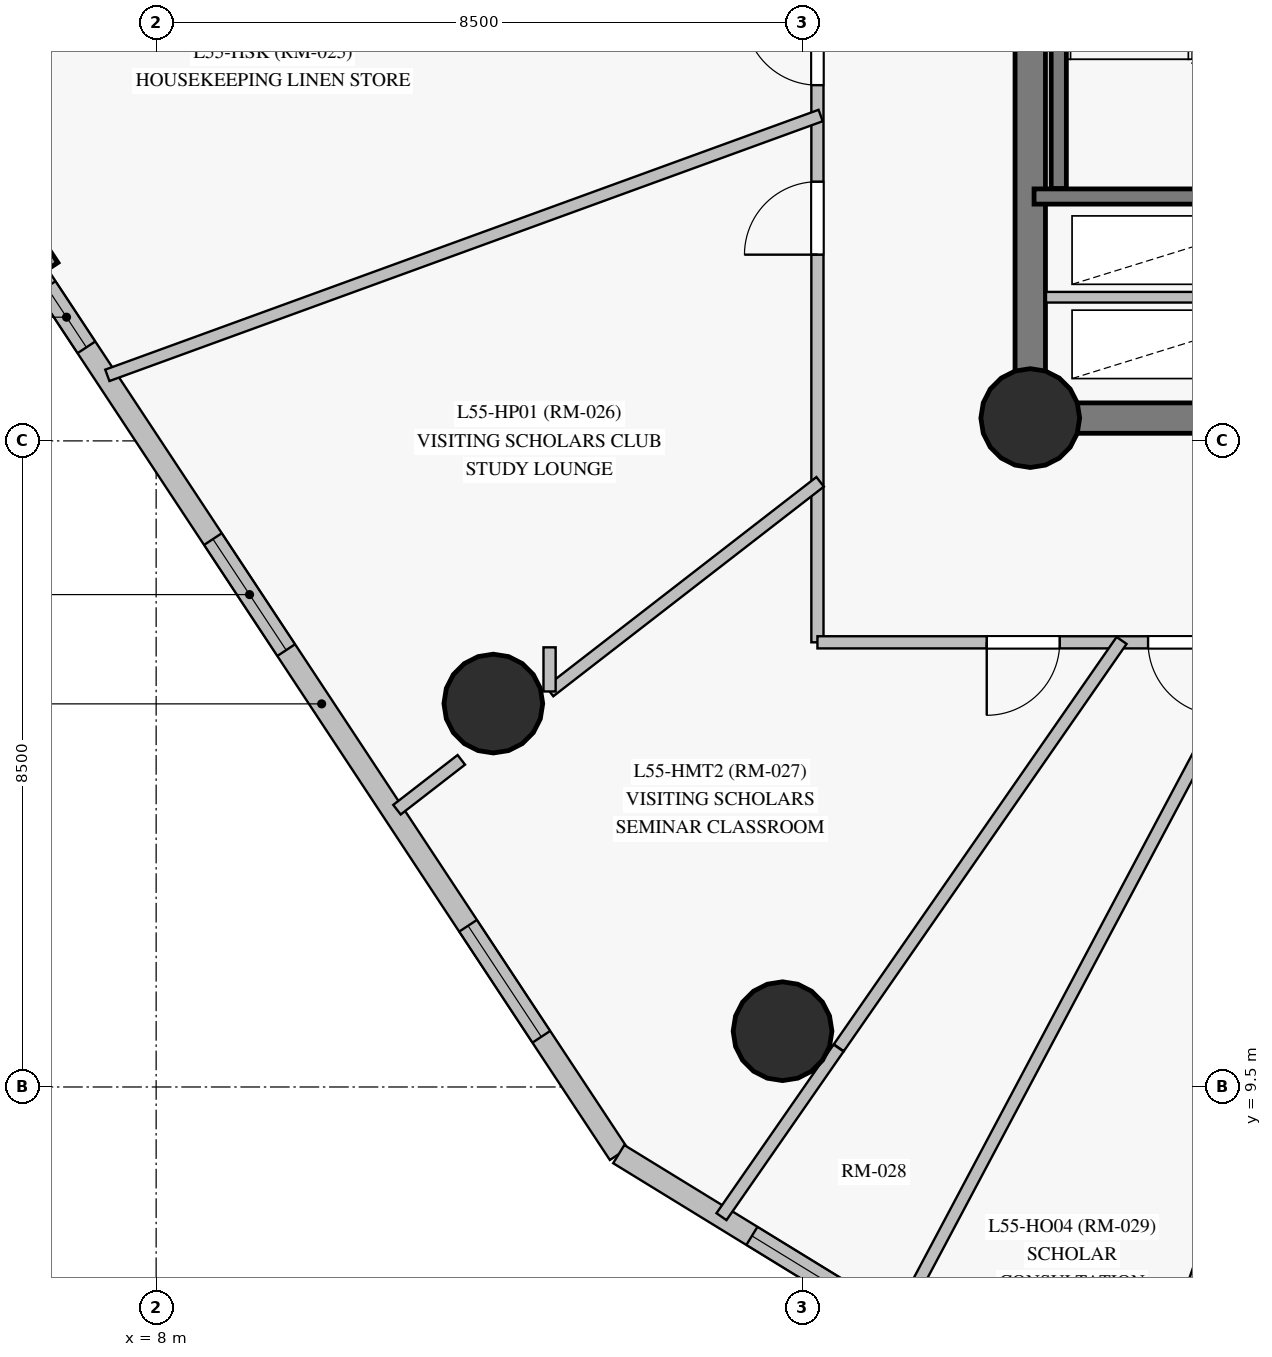
"""IFC4 building model, lengths in metres.
Left out: names, types, materials, properties, quantities, classifications, styles, units other than length and angle.
Written with IfcOpenShell. Run it as: python <this file> out.ifc"""

import sys

from ifc_helpers import new_model, si_unit, direction, frame, frame_2d, origin, origin_with_axes, origin_2d, place, context, subcontext, project, spatial, rectangle, circle, extrude, source, transform, mapped, element, fill, save


model = new_model("IFC4")
c1 = context("Model", 3, precision=1e-05, world=origin(), true_north=direction((0.0, 1.0)))
c2 = subcontext(c1, "Body", "Model", "MODEL_VIEW")
j1 = project(units=[si_unit("LENGTHUNIT", "METRE"), si_unit("PLANEANGLEUNIT", "RADIAN")], contexts=[c1])
p1 = place(None, origin())
s1 = spatial("IfcSite", under=j1, at=p1, CompositionType="ELEMENT")
p2 = place(p1, origin())
s2 = spatial("IfcBuilding", under=s1, at=p2, CompositionType="ELEMENT")
p3 = place(p2, frame((0.0, 0.0, 190.1)))
s3 = spatial("IfcBuildingStorey", under=s2, at=p3, CompositionType="ELEMENT", Elevation=190.1)
p4 = place(p3, frame((19.5, 18.3, 0.0), z_axis=(0.0, 0.0, 1.0), x_axis=(1.0, 0.0, 0.0)))
e1 = element("IfcWall", 1, at=p4, inside=s3, PredefinedType="SHEAR", context=c2, shape_type="SweptSolid", body=[
    extrude(rectangle(XDim=7.05, YDim=0.4, at=frame_2d((3.525, 0.0))), origin(), (0.0, 0.0, 1.0), 2.825),
])
p5 = place(p4, frame((4.2, 0.0, 0.0)))
e2 = element("IfcOpeningElement", 2, at=p5, cuts=e1, PredefinedType="OPENING", context=c2, shape_type="SweptSolid", body=[
    extrude(rectangle(XDim=1.4, YDim=2.2, at=frame_2d((0.7, 1.1))), frame((0.0, 0.21, 0.0), z_axis=(0.0, -1.0, 0.0), x_axis=(1.0, 0.0, 0.0)), (0.0, 0.0, 1.0), 0.42),
])
p6 = place(p3, frame((19.5, 34.7, 0.0), z_axis=(0.0, 0.0, 1.0), x_axis=(0.0, -1.0, 0.0)))
e3 = element("IfcWall", 3, at=p6, inside=s3, PredefinedType="SHEAR", context=c2, shape_type="SweptSolid", body=[
    extrude(rectangle(XDim=16.4, YDim=0.4, at=frame_2d((8.2, 0.0))), origin(), (0.0, 0.0, 1.0), 2.825),
])
p7 = place(p6, frame((3.1, 0.0, 0.0)))
e4 = element("IfcOpeningElement", 4, at=p7, cuts=e3, PredefinedType="OPENING", context=c2, shape_type="SweptSolid", body=[
    extrude(rectangle(XDim=1.1, YDim=2.15, at=frame_2d((0.55, 1.075))), frame((0.0, 0.21, 0.0), z_axis=(0.0, -1.0, 0.0), x_axis=(1.0, 0.0, 0.0)), (0.0, 0.0, 1.0), 0.42),
])
m1 = source(origin_with_axes(), c2, "Body", "SweptSolid", [
    extrude(circle(Radius=0.65, at=origin_2d()), origin(), (0.0, 0.0, 1.0), 3.05),
])
for number, where, z_axis, x_axis in (
    (5, (19.5, 18.3, 0.0), (0.0, 0.0, 1.0), (1.0, 0.0, 0.0)),
    (6, (12.436, 14.544, 0.0), (0.0, 0.0, 1.0), (1.0, 0.0, 0.0)),
    (7, (16.241, 10.234, 0.0), (0.0, 0.0, 1.0), (1.0, 0.0, 0.0)),
):
    element("IfcColumn", number, at=place(p3, frame(where, z_axis=z_axis, x_axis=x_axis)), inside=s3, PredefinedType="COLUMN", context=c2, shape_type="MappedRepresentation", body=[
        mapped(m1, transform((0.0, 0.0, 0.0), scale=1.0)),
    ])
p8 = place(p3, frame((6.269, 20.464, 0.0), z_axis=(0.0, 0.0, 1.0), x_axis=(0.550716639054, -0.834692268725, 0.0)))
e8 = element("IfcWall", 8, at=p8, inside=s3, PredefinedType="SOLIDWALL", context=c2, shape_type="SweptSolid", body=[
    extrude(rectangle(XDim=14.194, YDim=0.28, at=frame_2d((7.097, 0.0))), origin(), (0.0, 0.0, 1.0), 2.825),
])
p9 = place(p8, frame((0.527, 0.0, 0.85)))
e9 = element("IfcOpeningElement", 9, at=p9, cuts=e8, PredefinedType="OPENING", context=c2, shape_type="SweptSolid", body=[
    extrude(rectangle(XDim=0.95, YDim=1.5, at=frame_2d((0.475, 0.75))), frame((0.0, 0.15, 0.0), z_axis=(0.0, -1.0, 0.0), x_axis=(1.0, 0.0, 0.0)), (0.0, 0.0, 1.0), 0.3),
])
p10 = place(p8, frame((4.5, 0.0, 0.85)))
e10 = element("IfcOpeningElement", 10, at=p10, cuts=e8, PredefinedType="OPENING", context=c2, shape_type="SweptSolid", body=[
    extrude(rectangle(XDim=1.75, YDim=1.65, at=frame_2d((0.875, 0.825))), frame((0.0, 0.15, 0.0), z_axis=(0.0, -1.0, 0.0), x_axis=(1.0, 0.0, 0.0)), (0.0, 0.0, 1.0), 0.3),
])
p11 = place(p8, frame((10.594, 0.0, 0.85)))
e11 = element("IfcOpeningElement", 11, at=p11, cuts=e8, PredefinedType="OPENING", context=c2, shape_type="SweptSolid", body=[
    extrude(rectangle(XDim=1.75, YDim=1.65, at=frame_2d((0.875, 0.825))), frame((0.0, 0.15, 0.0), z_axis=(0.0, -1.0, 0.0), x_axis=(1.0, 0.0, 0.0)), (0.0, 0.0, 1.0), 0.3),
])
p12 = place(p3, frame((14.086, 8.616, 0.0), z_axis=(0.0, 0.0, 1.0), x_axis=(0.852261121645, -0.523116603189, 0.0)))
e12 = element("IfcWall", 12, at=p12, inside=s3, PredefinedType="SOLIDWALL", context=c2, shape_type="SweptSolid", body=[
    extrude(rectangle(XDim=10.239, YDim=0.28, at=frame_2d((5.12, 0.0))), origin(), (0.0, 0.0, 1.0), 2.825),
])
p13 = place(p12, frame((2.056, 0.0, 0.85)))
e13 = element("IfcOpeningElement", 13, at=p13, cuts=e12, PredefinedType="OPENING", context=c2, shape_type="SweptSolid", body=[
    extrude(rectangle(XDim=1.75, YDim=1.65, at=frame_2d((0.875, 0.825))), frame((0.0, 0.15, 0.0), z_axis=(0.0, -1.0, 0.0), x_axis=(1.0, 0.0, 0.0)), (0.0, 0.0, 1.0), 0.3),
])
p14 = place(p12, frame((5.203, 0.0, 0.85)))
e14 = element("IfcOpeningElement", 14, at=p14, cuts=e12, PredefinedType="OPENING", context=c2, shape_type="SweptSolid", body=[
    extrude(rectangle(XDim=1.75, YDim=1.65, at=frame_2d((0.875, 0.825))), frame((0.0, 0.15, 0.0), z_axis=(0.0, -1.0, 0.0), x_axis=(1.0, 0.0, 0.0)), (0.0, 0.0, 1.0), 0.3),
])
p15 = place(p12, frame((8.554, 0.0, 0.85)))
e15 = element("IfcOpeningElement", 15, at=p15, cuts=e12, PredefinedType="OPENING", context=c2, shape_type="SweptSolid", body=[
    extrude(rectangle(XDim=0.95, YDim=1.5, at=frame_2d((0.475, 0.75))), frame((0.0, 0.15, 0.0), z_axis=(0.0, -1.0, 0.0), x_axis=(1.0, 0.0, 0.0)), (0.0, 0.0, 1.0), 0.3),
])
p16 = place(p3, frame((19.875, 21.32, 0.0), z_axis=(0.0, 0.0, 1.0), x_axis=(0.0, 1.0, 0.0)))
e16 = element("IfcWall", 16, at=p16, inside=s3, PredefinedType="SHEAR", context=c2, shape_type="SweptSolid", body=[
    extrude(rectangle(XDim=7.5, YDim=0.2, at=frame_2d((3.75, 0.0))), origin(), (0.0, 0.0, 1.0), 2.825),
])
p17 = place(p3, frame((19.55, 21.215, 0.0), z_axis=(0.0, 0.0, 1.0), x_axis=(1.0, 0.0, 0.0)))
e17 = element("IfcWall", 17, at=p17, inside=s3, PredefinedType="SHEAR", context=c2, shape_type="SweptSolid", body=[
    extrude(rectangle(XDim=3.995, YDim=0.2, at=frame_2d((1.998, 0.0))), origin(), (0.0, 0.0, 1.0), 2.825),
])
p18 = place(p3, frame((16.7, 15.35, 0.0), z_axis=(0.0, 0.0, 1.0), x_axis=(0.0, 1.0, 0.0)))
e18 = element("IfcWall", 18, at=p18, inside=s3, PredefinedType="PARTITIONING", context=c2, shape_type="SweptSolid", body=[
    extrude(rectangle(XDim=22.3, YDim=0.16, at=frame_2d((11.15, 0.0))), origin(), (0.0, 0.0, 1.0), 2.275),
])
p19 = place(p18, frame((16.25, 0.0, 0.0)))
e19 = element("IfcOpeningElement", 19, at=p19, cuts=e18, PredefinedType="OPENING", context=c2, shape_type="SweptSolid", body=[
    extrude(rectangle(XDim=0.96, YDim=2.15, at=frame_2d((0.48, 1.075))), frame((0.0, 0.09, 0.0), z_axis=(0.0, -1.0, 0.0), x_axis=(1.0, 0.0, 0.0)), (0.0, 0.0, 1.0), 0.18),
])
p20 = place(p18, frame((11.065, 0.0, 0.0)))
e20 = element("IfcOpeningElement", 20, at=p20, cuts=e18, PredefinedType="OPENING", context=c2, shape_type="SweptSolid", body=[
    extrude(rectangle(XDim=0.96, YDim=2.15, at=frame_2d((0.48, 1.075))), frame((0.0, 0.09, 0.0), z_axis=(0.0, -1.0, 0.0), x_axis=(1.0, 0.0, 0.0)), (0.0, 0.0, 1.0), 0.18),
])
p21 = place(p18, frame((7.33, 0.0, 0.0)))
e21 = element("IfcOpeningElement", 21, at=p21, cuts=e18, PredefinedType="OPENING", context=c2, shape_type="SweptSolid", body=[
    extrude(rectangle(XDim=0.96, YDim=2.15, at=frame_2d((0.48, 1.075))), frame((0.0, 0.09, 0.0), z_axis=(0.0, -1.0, 0.0), x_axis=(1.0, 0.0, 0.0)), (0.0, 0.0, 1.0), 0.18),
])
p22 = place(p18, frame((5.1, 0.0, 0.0)))
e22 = element("IfcOpeningElement", 22, at=p22, cuts=e18, PredefinedType="OPENING", context=c2, shape_type="SweptSolid", body=[
    extrude(rectangle(XDim=0.96, YDim=2.15, at=frame_2d((0.48, 1.075))), frame((0.0, 0.09, 0.0), z_axis=(0.0, -1.0, 0.0), x_axis=(1.0, 0.0, 0.0)), (0.0, 0.0, 1.0), 0.18),
])
p23 = place(p18, frame((18.392, 0.0, 0.0)))
e23 = element("IfcOpeningElement", 23, at=p23, cuts=e18, PredefinedType="OPENING", context=c2, shape_type="SweptSolid", body=[
    extrude(rectangle(XDim=0.96, YDim=2.15, at=frame_2d((0.48, 1.075))), frame((0.0, 0.09, 0.0), z_axis=(0.0, -1.0, 0.0), x_axis=(1.0, 0.0, 0.0)), (0.0, 0.0, 1.0), 0.18),
])
p24 = place(p3, frame((24.585, 15.378, 0.0), z_axis=(0.0, 0.0, 1.0), x_axis=(-0.327238910926, -0.944941635857, 0.0)))
e24 = element("IfcWall", 24, at=p24, inside=s3, PredefinedType="PARTITIONING", context=c2, shape_type="SweptSolid", body=[
    extrude(rectangle(XDim=11.498, YDim=0.16, at=frame_2d((5.749, 0.0))), origin(), (0.0, 0.0, 1.0), 2.825),
])
p25 = place(p3, frame((27.55, 15.35, 0.0), z_axis=(0.0, 0.0, 1.0), x_axis=(-1.0, 0.0, 0.0)))
e25 = element("IfcWall", 25, at=p25, inside=s3, PredefinedType="PARTITIONING", context=c2, shape_type="SweptSolid", body=[
    extrude(rectangle(XDim=10.85, YDim=0.16, at=frame_2d((5.425, 0.0))), origin(), (0.0, 0.0, 1.0), 2.375),
])
p26 = place(p25, frame((7.663, 0.0, 0.0)))
e26 = element("IfcOpeningElement", 26, at=p26, cuts=e25, PredefinedType="OPENING", context=c2, shape_type="SweptSolid", body=[
    extrude(rectangle(XDim=0.96, YDim=2.15, at=frame_2d((0.48, 1.075))), frame((0.0, 0.09, 0.0), z_axis=(0.0, -1.0, 0.0), x_axis=(1.0, 0.0, 0.0)), (0.0, 0.0, 1.0), 0.18),
])
p27 = place(p25, frame((5.54, 0.0, 0.0)))
e27 = element("IfcOpeningElement", 27, at=p27, cuts=e25, PredefinedType="OPENING", context=c2, shape_type="SweptSolid", body=[
    extrude(rectangle(XDim=0.96, YDim=2.15, at=frame_2d((0.48, 1.075))), frame((0.0, 0.09, 0.0), z_axis=(0.0, -1.0, 0.0), x_axis=(1.0, 0.0, 0.0)), (0.0, 0.0, 1.0), 0.18),
])
p28 = place(p25, frame((3.323, 0.0, 0.0)))
e28 = element("IfcOpeningElement", 28, at=p28, cuts=e25, PredefinedType="OPENING", context=c2, shape_type="SweptSolid", body=[
    extrude(rectangle(XDim=0.96, YDim=2.15, at=frame_2d((0.48, 1.075))), frame((0.0, 0.09, 0.0), z_axis=(0.0, -1.0, 0.0), x_axis=(1.0, 0.0, 0.0)), (0.0, 0.0, 1.0), 0.18),
])
p29 = place(p25, frame((1.748, 0.0, 0.0)))
e29 = element("IfcOpeningElement", 29, at=p29, cuts=e25, PredefinedType="OPENING", context=c2, shape_type="SweptSolid", body=[
    extrude(rectangle(XDim=0.96, YDim=2.15, at=frame_2d((0.48, 1.075))), frame((0.0, 0.09, 0.0), z_axis=(0.0, -1.0, 0.0), x_axis=(1.0, 0.0, 0.0)), (0.0, 0.0, 1.0), 0.18),
])
p30 = place(p3, frame((22.525, 15.39, 0.0), z_axis=(0.0, 0.0, 1.0), x_axis=(-0.469441564183, -0.882963542746, 0.0)))
e30 = element("IfcWall", 30, at=p30, inside=s3, PredefinedType="PARTITIONING", context=c2, shape_type="SweptSolid", body=[
    extrude(rectangle(XDim=10.181, YDim=0.16, at=frame_2d((5.091, 0.0))), origin(), (0.0, 0.0, 1.0), 2.825),
])
p31 = place(p3, frame((16.742, 22.281, 0.0), z_axis=(0.0, 0.0, 1.0), x_axis=(-0.939600572321, -0.342272938593, 0.0)))
e31 = element("IfcWall", 31, at=p31, inside=s3, PredefinedType="PARTITIONING", context=c2, shape_type="SweptSolid", body=[
    extrude(rectangle(XDim=9.988, YDim=0.16, at=frame_2d((4.994, 0.0))), origin(), (0.0, 0.0, 1.0), 2.825),
])
p32 = place(p3, frame((20.702, 15.375, 0.0), z_axis=(0.0, 0.0, 1.0), x_axis=(-0.570371261256, -0.821387012518, 0.0)))
e32 = element("IfcWall", 32, at=p32, inside=s3, PredefinedType="PARTITIONING", context=c2, shape_type="SweptSolid", body=[
    extrude(rectangle(XDim=6.523, YDim=0.16, at=frame_2d((3.262, 0.0))), origin(), (0.0, 0.0, 1.0), 2.825),
])
p33 = place(p3, frame((16.736, 17.461, 0.0), z_axis=(0.0, 0.0, 1.0), x_axis=(-0.790506924832, -0.612453101708, 0.0)))
e33 = element("IfcWall", 33, at=p33, inside=s3, PredefinedType="PARTITIONING", context=c2, shape_type="SweptSolid", body=[
    extrude(rectangle(XDim=4.503, YDim=0.16, at=frame_2d((2.251, 0.0))), origin(), (0.0, 0.0, 1.0), 2.275),
])
p34 = place(p3, frame((19.707, 19.89, 0.0), z_axis=(0.0, 0.0, 1.0), x_axis=(1.0, 0.0, 0.0)))
e34 = element("IfcWall", 34, at=p34, inside=s3, PredefinedType="PARTITIONING", context=c2, shape_type="SweptSolid", body=[
    extrude(rectangle(XDim=3.79, YDim=0.14, at=frame_2d((1.895, 0.0))), origin(), (0.0, 0.0, 1.0), 2.825),
])
p35 = place(p3, frame((16.978, 10.012, 0.0), z_axis=(0.0, 0.0, 1.0), x_axis=(-0.570412750216, -0.821358201025, 0.0)))
e35 = element("IfcWall", 35, at=p35, inside=s3, PredefinedType="PARTITIONING", context=c2, shape_type="SweptSolid", body=[
    extrude(rectangle(XDim=2.701, YDim=0.16, at=frame_2d((1.35, 0.0))), origin(), (0.0, 0.0, 1.0), 2.825),
])
p36 = place(p3, frame((12.015, 13.804, 0.0), z_axis=(0.0, 0.0, 1.0), x_axis=(-0.790577783058, -0.612361632481, 0.0)))
e36 = element("IfcWall", 36, at=p36, inside=s3, PredefinedType="PARTITIONING", context=c2, shape_type="SweptSolid", body=[
    extrude(rectangle(XDim=1.071, YDim=0.16, at=frame_2d((0.536, 0.0))), origin(), (0.0, 0.0, 1.0), 2.825),
])
p37 = place(p3, frame((13.176, 14.703, 0.0), z_axis=(0.0, 0.0, 1.0), x_axis=(0.0, 1.0, 0.0)))
e37 = element("IfcWall", 37, at=p37, inside=s3, PredefinedType="PARTITIONING", context=c2, shape_type="SweptSolid", body=[
    extrude(rectangle(XDim=0.581, YDim=0.16, at=frame_2d((0.29, 0.0))), origin(), (0.0, 0.0, 1.0), 2.275),
])
m2 = source(origin_with_axes(), c2, "Body", "SweptSolid", [
    extrude(rectangle(XDim=0.95, YDim=1.5, at=frame_2d((0.475, 0.75))), frame((0.0, 0.03, 0.0), z_axis=(0.0, -1.0, 0.0), x_axis=(1.0, 0.0, 0.0)), (0.0, 0.0, 1.0), 0.06),
])
p38 = place(p9, origin())
e38 = element("IfcWindow", 38, at=p38, inside=s3, PartitioningType="SINGLE_PANEL", PredefinedType="WINDOW", context=c2, shape_type="MappedRepresentation", body=[
    mapped(m2, transform((0.0, 0.0, 0.0), scale=1.0)),
])
fill(e9, e38)
m3 = source(origin_with_axes(), c2, "Body", "SweptSolid", [
    extrude(rectangle(XDim=1.75, YDim=1.65, at=frame_2d((0.875, 0.825))), frame((0.0, 0.03, 0.0), z_axis=(0.0, -1.0, 0.0), x_axis=(1.0, 0.0, 0.0)), (0.0, 0.0, 1.0), 0.06),
])
p39 = place(p10, origin())
e39 = element("IfcWindow", 39, at=p39, inside=s3, PartitioningType="SINGLE_PANEL", PredefinedType="WINDOW", context=c2, shape_type="MappedRepresentation", body=[
    mapped(m3, transform((0.0, 0.0, 0.0), scale=1.0)),
])
fill(e10, e39)
p40 = place(p11, origin())
e40 = element("IfcWindow", 40, at=p40, inside=s3, PartitioningType="SINGLE_PANEL", PredefinedType="WINDOW", context=c2, shape_type="MappedRepresentation", body=[
    mapped(m3, transform((0.0, 0.0, 0.0), scale=1.0)),
])
fill(e11, e40)
p41 = place(p13, origin())
e41 = element("IfcWindow", 41, at=p41, inside=s3, PartitioningType="SINGLE_PANEL", PredefinedType="WINDOW", context=c2, shape_type="MappedRepresentation", body=[
    mapped(m3, transform((0.0, 0.0, 0.0), scale=1.0)),
])
fill(e13, e41)
m4 = source(origin_with_axes(), c2, "Body", "SweptSolid", [
    extrude(rectangle(XDim=0.96, YDim=2.15, at=frame_2d((0.48, 1.075))), frame((0.0, 0.025, 0.0), z_axis=(0.0, -1.0, 0.0), x_axis=(1.0, 0.0, 0.0)), (0.0, 0.0, 1.0), 0.05),
])
p42 = place(p21, origin())
e42 = element("IfcDoor", 42, at=p42, inside=s3, OperationType="SINGLE_SWING_RIGHT", PredefinedType="DOOR", context=c2, shape_type="MappedRepresentation", body=[
    mapped(m4, transform((0.0, 0.0, 0.0), scale=1.0)),
])
fill(e21, e42)
p43 = place(p22, origin())
e43 = element("IfcDoor", 43, at=p43, inside=s3, OperationType="SINGLE_SWING_LEFT", PredefinedType="DOOR", context=c2, shape_type="MappedRepresentation", body=[
    mapped(m4, transform((0.0, 0.0, 0.0), scale=1.0)),
])
fill(e22, e43)
p44 = place(p26, origin())
e44 = element("IfcDoor", 44, at=p44, inside=s3, OperationType="SINGLE_SWING_RIGHT", PredefinedType="DOOR", context=c2, shape_type="MappedRepresentation", body=[
    mapped(m4, transform((0.0, 0.0, 0.0), scale=1.0)),
])
fill(e26, e44)
p45 = place(p27, origin())
e45 = element("IfcDoor", 45, at=p45, inside=s3, OperationType="SINGLE_SWING_LEFT", PredefinedType="DOOR", context=c2, shape_type="MappedRepresentation", body=[
    mapped(m4, transform((0.0, 0.0, 0.0), scale=1.0)),
])
fill(e27, e45)
save(model, sys.argv[1])
